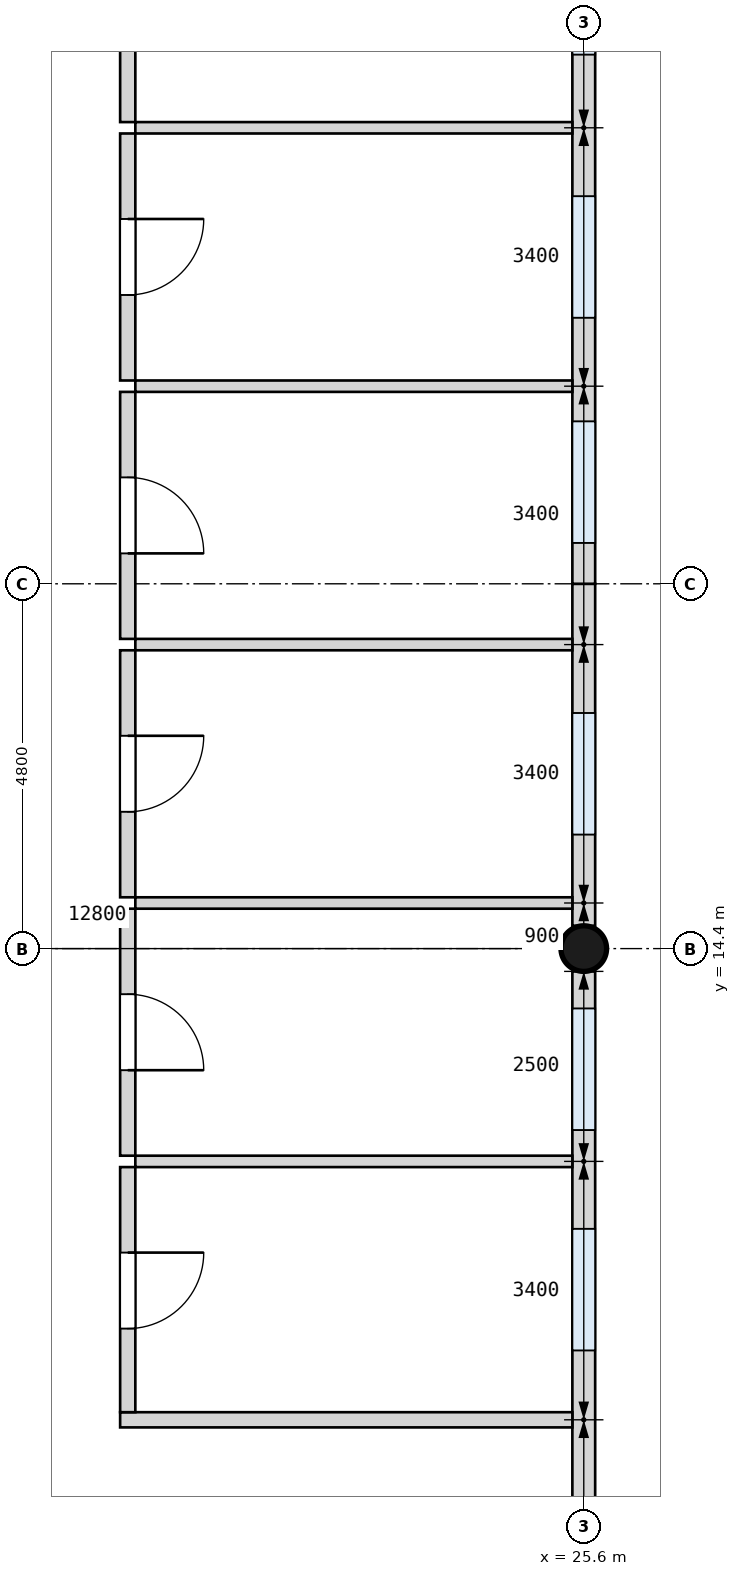
"""IFC4 building model, lengths in metres.
Left out: names, types, materials, properties, quantities, classifications, styles, units other than length and angle.
Written with IfcOpenShell. Run it as: python <this file> out.ifc"""

import sys

from ifc_helpers import new_model, si_unit, direction, frame, frame_2d, origin, origin_2d, place, context, subcontext, project, spatial, rectangle, circle, extrude, element, fill, save


model = new_model("IFC4")
c1 = context("Model", 3, precision=1e-05, world=origin(), true_north=direction((0.0, 1.0)))
c2 = subcontext(c1, "Body", "Model", "MODEL_VIEW")
j1 = project(units=[si_unit("LENGTHUNIT", "METRE"), si_unit("PLANEANGLEUNIT", "RADIAN")], contexts=[c1])
p1 = place(None, origin())
s1 = spatial("IfcSite", under=j1, at=p1, CompositionType="ELEMENT")
p2 = place(p1, origin())
s2 = spatial("IfcBuilding", under=s1, at=p2, CompositionType="ELEMENT")
p3 = place(p2, frame((0.0, 0.0, 4.2)))
s3 = spatial("IfcBuildingStorey", under=s2, at=p3, CompositionType="ELEMENT", Elevation=4.2)
p4 = place(p3, frame((25.6, 14.4, 0.0), z_axis=(0.0, 0.0, 1.0), x_axis=(1.0, 0.0, 0.0)))
e1 = element("IfcColumn", 1, at=p4, inside=s3, PredefinedType="COLUMN", context=c2, shape_type="SweptSolid", body=[
    extrude(circle(Radius=0.3, at=origin_2d()), origin(), (0.0, 0.0, 1.0), 4.2),
])
p5 = place(p3, frame((25.6, 0.3, 0.0), z_axis=(0.0, 0.0, 1.0), x_axis=(0.0, 1.0, 0.0)))
e2 = element("IfcWall", 2, at=p5, inside=s3, PredefinedType="SOLIDWALL", context=c2, shape_type="SweptSolid", body=[
    extrude(rectangle(XDim=13.8, YDim=0.3, at=frame_2d((6.9, 0.0))), origin(), (0.0, 0.0, 1.0), 2.9),
])
p6 = place(p5, frame((1.975, 0.0, 1.0)))
e3 = element("IfcOpeningElement", 3, at=p6, cuts=e2, PredefinedType="OPENING", context=c2, shape_type="SweptSolid", body=[
    extrude(rectangle(XDim=1.6, YDim=1.8, at=frame_2d((0.8, 0.9))), frame((0.0, 0.16, 0.0), z_axis=(0.0, -1.0, 0.0), x_axis=(1.0, 0.0, 0.0)), (0.0, 0.0, 1.0), 0.32),
])
p7 = place(p5, frame((8.812, 0.0, 1.0)))
e4 = element("IfcOpeningElement", 4, at=p7, cuts=e2, PredefinedType="OPENING", context=c2, shape_type="SweptSolid", body=[
    extrude(rectangle(XDim=1.6, YDim=1.8, at=frame_2d((0.8, 0.9))), frame((0.0, 0.16, 0.0), z_axis=(0.0, -1.0, 0.0), x_axis=(1.0, 0.0, 0.0)), (0.0, 0.0, 1.0), 0.32),
])
p8 = place(p5, frame((11.712, 0.0, 1.0)))
e5 = element("IfcOpeningElement", 5, at=p8, cuts=e2, PredefinedType="OPENING", context=c2, shape_type="SweptSolid", body=[
    extrude(rectangle(XDim=1.6, YDim=1.8, at=frame_2d((0.8, 0.9))), frame((0.0, 0.16, 0.0), z_axis=(0.0, -1.0, 0.0), x_axis=(1.0, 0.0, 0.0)), (0.0, 0.0, 1.0), 0.32),
])
p9 = place(p3, frame((25.6, 14.7, 0.0), z_axis=(0.0, 0.0, 1.0), x_axis=(0.0, 1.0, 0.0)))
e6 = element("IfcWall", 6, at=p9, inside=s3, PredefinedType="SOLIDWALL", context=c2, shape_type="SweptSolid", body=[
    extrude(rectangle(XDim=4.5, YDim=0.3, at=frame_2d((2.25, 0.0))), origin(), (0.0, 0.0, 1.0), 2.9),
])
p10 = place(p9, frame((1.2, 0.0, 1.0)))
e7 = element("IfcOpeningElement", 7, at=p10, cuts=e6, PredefinedType="OPENING", context=c2, shape_type="SweptSolid", body=[
    extrude(rectangle(XDim=1.6, YDim=1.8, at=frame_2d((0.8, 0.9))), frame((0.0, 0.16, 0.0), z_axis=(0.0, -1.0, 0.0), x_axis=(1.0, 0.0, 0.0)), (0.0, 0.0, 1.0), 0.32),
])
p11 = place(p3, frame((25.6, 19.2, 0.0), z_axis=(0.0, 0.0, 1.0), x_axis=(0.0, 1.0, 0.0)))
e8 = element("IfcWall", 8, at=p11, inside=s3, PredefinedType="SOLIDWALL", context=c2, shape_type="SweptSolid", body=[
    extrude(rectangle(XDim=9.6, YDim=0.3, at=frame_2d((4.8, 0.0))), origin(), (0.0, 0.0, 1.0), 2.9),
])
p12 = place(p11, frame((0.538, 0.0, 1.0)))
e9 = element("IfcOpeningElement", 9, at=p12, cuts=e8, PredefinedType="OPENING", context=c2, shape_type="SweptSolid", body=[
    extrude(rectangle(XDim=1.6, YDim=1.8, at=frame_2d((0.8, 0.9))), frame((0.0, 0.16, 0.0), z_axis=(0.0, -1.0, 0.0), x_axis=(1.0, 0.0, 0.0)), (0.0, 0.0, 1.0), 0.32),
])
p13 = place(p11, frame((3.5, 0.0, 1.0)))
e10 = element("IfcOpeningElement", 10, at=p13, cuts=e8, PredefinedType="OPENING", context=c2, shape_type="SweptSolid", body=[
    extrude(rectangle(XDim=1.6, YDim=1.8, at=frame_2d((0.8, 0.9))), frame((0.0, 0.16, 0.0), z_axis=(0.0, -1.0, 0.0), x_axis=(1.0, 0.0, 0.0)), (0.0, 0.0, 1.0), 0.32),
])
p14 = place(p11, frame((6.962, 0.0, 1.0)))
e11 = element("IfcOpeningElement", 11, at=p14, cuts=e8, PredefinedType="OPENING", context=c2, shape_type="SweptSolid", body=[
    extrude(rectangle(XDim=1.6, YDim=1.8, at=frame_2d((0.8, 0.9))), frame((0.0, 0.16, 0.0), z_axis=(0.0, -1.0, 0.0), x_axis=(1.0, 0.0, 0.0)), (0.0, 0.0, 1.0), 0.32),
])
p15 = place(p3, frame((19.5, 8.2, 0.0), z_axis=(0.0, 0.0, 1.0), x_axis=(1.0, 0.0, 0.0)))
e12 = element("IfcWall", 12, at=p15, inside=s3, PredefinedType="PARTITIONING", context=c2, shape_type="SweptSolid", body=[
    extrude(rectangle(XDim=5.95, YDim=0.2, at=frame_2d((2.975, 0.0))), origin(), (0.0, 0.0, 1.0), 3.9),
])
for number, where, z_axis, x_axis in (
    (13, (19.7, 11.6, 0.0), (0.0, 0.0, 1.0), (1.0, 0.0, 0.0)),
    (14, (19.7, 15.0, 0.0), (0.0, 0.0, 1.0), (1.0, 0.0, 0.0)),
    (15, (19.7, 18.4, 0.0), (0.0, 0.0, 1.0), (1.0, 0.0, 0.0)),
    (16, (19.7, 21.8, 0.0), (0.0, 0.0, 1.0), (1.0, 0.0, 0.0)),
    (17, (19.7, 25.2, 0.0), (0.0, 0.0, 1.0), (1.0, 0.0, 0.0)),
):
    element("IfcWall", number, at=place(p3, frame(where, z_axis=z_axis, x_axis=x_axis)), inside=s3, PredefinedType="PARTITIONING", context=c2, shape_type="SweptSolid", body=[
        extrude(rectangle(XDim=5.75, YDim=0.15, at=frame_2d((2.875, 0.0))), origin(), (0.0, 0.0, 1.0), 3.9),
    ])
p16 = place(p3, frame((19.6, 8.3, 0.0), z_axis=(0.0, 0.0, 1.0), x_axis=(0.0, 1.0, 0.0)))
e18 = element("IfcWall", 18, at=p16, inside=s3, PredefinedType="PARTITIONING", context=c2, shape_type="SweptSolid", body=[
    extrude(rectangle(XDim=3.225, YDim=0.2, at=frame_2d((1.612, 0.0))), origin(), (0.0, 0.0, 1.0), 3.9),
])
p17 = place(p16, frame((1.1, 0.0, 0.0)))
e19 = element("IfcOpeningElement", 19, at=p17, cuts=e18, PredefinedType="OPENING", context=c2, shape_type="SweptSolid", body=[
    extrude(rectangle(XDim=1.0, YDim=2.1, at=frame_2d((0.5, 1.05))), frame((0.0, 0.11, 0.0), z_axis=(0.0, -1.0, 0.0), x_axis=(1.0, 0.0, 0.0)), (0.0, 0.0, 1.0), 0.22),
])
p18 = place(p3, frame((19.6, 11.675, 0.0), z_axis=(0.0, 0.0, 1.0), x_axis=(0.0, 1.0, 0.0)))
e20 = element("IfcWall", 20, at=p18, inside=s3, PredefinedType="PARTITIONING", context=c2, shape_type="SweptSolid", body=[
    extrude(rectangle(XDim=3.25, YDim=0.2, at=frame_2d((1.625, 0.0))), origin(), (0.0, 0.0, 1.0), 3.9),
])
p19 = place(p18, frame((1.125, 0.0, 0.0)))
e21 = element("IfcOpeningElement", 21, at=p19, cuts=e20, PredefinedType="OPENING", context=c2, shape_type="SweptSolid", body=[
    extrude(rectangle(XDim=1.0, YDim=2.1, at=frame_2d((0.5, 1.05))), frame((0.0, 0.11, 0.0), z_axis=(0.0, -1.0, 0.0), x_axis=(1.0, 0.0, 0.0)), (0.0, 0.0, 1.0), 0.22),
])
p20 = place(p3, frame((19.6, 15.075, 0.0), z_axis=(0.0, 0.0, 1.0), x_axis=(0.0, 1.0, 0.0)))
e22 = element("IfcWall", 22, at=p20, inside=s3, PredefinedType="PARTITIONING", context=c2, shape_type="SweptSolid", body=[
    extrude(rectangle(XDim=3.25, YDim=0.2, at=frame_2d((1.625, 0.0))), origin(), (0.0, 0.0, 1.0), 3.9),
])
p21 = place(p20, frame((1.125, 0.0, 0.0)))
e23 = element("IfcOpeningElement", 23, at=p21, cuts=e22, PredefinedType="OPENING", context=c2, shape_type="SweptSolid", body=[
    extrude(rectangle(XDim=1.0, YDim=2.1, at=frame_2d((0.5, 1.05))), frame((0.0, 0.11, 0.0), z_axis=(0.0, -1.0, 0.0), x_axis=(1.0, 0.0, 0.0)), (0.0, 0.0, 1.0), 0.22),
])
p22 = place(p3, frame((19.6, 18.475, 0.0), z_axis=(0.0, 0.0, 1.0), x_axis=(0.0, 1.0, 0.0)))
e24 = element("IfcWall", 24, at=p22, inside=s3, PredefinedType="PARTITIONING", context=c2, shape_type="SweptSolid", body=[
    extrude(rectangle(XDim=3.25, YDim=0.2, at=frame_2d((1.625, 0.0))), origin(), (0.0, 0.0, 1.0), 3.9),
])
p23 = place(p22, frame((1.125, 0.0, 0.0)))
e25 = element("IfcOpeningElement", 25, at=p23, cuts=e24, PredefinedType="OPENING", context=c2, shape_type="SweptSolid", body=[
    extrude(rectangle(XDim=1.0, YDim=2.1, at=frame_2d((0.5, 1.05))), frame((0.0, 0.11, 0.0), z_axis=(0.0, -1.0, 0.0), x_axis=(1.0, 0.0, 0.0)), (0.0, 0.0, 1.0), 0.22),
])
p24 = place(p3, frame((19.6, 21.875, 0.0), z_axis=(0.0, 0.0, 1.0), x_axis=(0.0, 1.0, 0.0)))
e26 = element("IfcWall", 26, at=p24, inside=s3, PredefinedType="PARTITIONING", context=c2, shape_type="SweptSolid", body=[
    extrude(rectangle(XDim=3.25, YDim=0.2, at=frame_2d((1.625, 0.0))), origin(), (0.0, 0.0, 1.0), 3.9),
])
p25 = place(p24, frame((1.125, 0.0, 0.0)))
e27 = element("IfcOpeningElement", 27, at=p25, cuts=e26, PredefinedType="OPENING", context=c2, shape_type="SweptSolid", body=[
    extrude(rectangle(XDim=1.0, YDim=2.1, at=frame_2d((0.5, 1.05))), frame((0.0, 0.11, 0.0), z_axis=(0.0, -1.0, 0.0), x_axis=(1.0, 0.0, 0.0)), (0.0, 0.0, 1.0), 0.22),
])
p26 = place(p3, frame((19.6, 25.275, 0.0), z_axis=(0.0, 0.0, 1.0), x_axis=(0.0, 1.0, 0.0)))
e28 = element("IfcWall", 28, at=p26, inside=s3, PredefinedType="PARTITIONING", context=c2, shape_type="SweptSolid", body=[
    extrude(rectangle(XDim=3.425, YDim=0.2, at=frame_2d((1.712, 0.0))), origin(), (0.0, 0.0, 1.0), 3.9),
])
p27 = place(p26, frame((1.225, 0.0, 0.0)))
e29 = element("IfcOpeningElement", 29, at=p27, cuts=e28, PredefinedType="OPENING", context=c2, shape_type="SweptSolid", body=[
    extrude(rectangle(XDim=1.0, YDim=2.1, at=frame_2d((0.5, 1.05))), frame((0.0, 0.11, 0.0), z_axis=(0.0, -1.0, 0.0), x_axis=(1.0, 0.0, 0.0)), (0.0, 0.0, 1.0), 0.22),
])
p28 = place(p17, frame((1.0, 0.0, 0.0), z_axis=(0.0, 0.0, 1.0), x_axis=(-1.0, 0.0, 0.0)))
e30 = element("IfcDoor", 30, at=p28, inside=s3, OperationType="SINGLE_SWING_LEFT", PredefinedType="DOOR", context=c2, shape_type="SweptSolid", body=[
    extrude(rectangle(XDim=1.0, YDim=2.1, at=frame_2d((0.5, 1.05))), frame((0.0, 0.025, 0.0), z_axis=(0.0, -1.0, 0.0), x_axis=(1.0, 0.0, 0.0)), (0.0, 0.0, 1.0), 0.05),
])
fill(e19, e30)
p29 = place(p19, frame((1.0, 0.0, 0.0), z_axis=(0.0, 0.0, 1.0), x_axis=(-1.0, 0.0, 0.0)))
e31 = element("IfcDoor", 31, at=p29, inside=s3, OperationType="SINGLE_SWING_RIGHT", PredefinedType="DOOR", context=c2, shape_type="SweptSolid", body=[
    extrude(rectangle(XDim=1.0, YDim=2.1, at=frame_2d((0.5, 1.05))), frame((0.0, 0.025, 0.0), z_axis=(0.0, -1.0, 0.0), x_axis=(1.0, 0.0, 0.0)), (0.0, 0.0, 1.0), 0.05),
])
fill(e21, e31)
p30 = place(p21, frame((1.0, 0.0, 0.0), z_axis=(0.0, 0.0, 1.0), x_axis=(-1.0, 0.0, 0.0)))
e32 = element("IfcDoor", 32, at=p30, inside=s3, OperationType="SINGLE_SWING_LEFT", PredefinedType="DOOR", context=c2, shape_type="SweptSolid", body=[
    extrude(rectangle(XDim=1.0, YDim=2.1, at=frame_2d((0.5, 1.05))), frame((0.0, 0.025, 0.0), z_axis=(0.0, -1.0, 0.0), x_axis=(1.0, 0.0, 0.0)), (0.0, 0.0, 1.0), 0.05),
])
fill(e23, e32)
p31 = place(p23, frame((1.0, 0.0, 0.0), z_axis=(0.0, 0.0, 1.0), x_axis=(-1.0, 0.0, 0.0)))
e33 = element("IfcDoor", 33, at=p31, inside=s3, OperationType="SINGLE_SWING_RIGHT", PredefinedType="DOOR", context=c2, shape_type="SweptSolid", body=[
    extrude(rectangle(XDim=1.0, YDim=2.1, at=frame_2d((0.5, 1.05))), frame((0.0, 0.025, 0.0), z_axis=(0.0, -1.0, 0.0), x_axis=(1.0, 0.0, 0.0)), (0.0, 0.0, 1.0), 0.05),
])
fill(e25, e33)
p32 = place(p25, frame((1.0, 0.0, 0.0), z_axis=(0.0, 0.0, 1.0), x_axis=(-1.0, 0.0, 0.0)))
e34 = element("IfcDoor", 34, at=p32, inside=s3, OperationType="SINGLE_SWING_LEFT", PredefinedType="DOOR", context=c2, shape_type="SweptSolid", body=[
    extrude(rectangle(XDim=1.0, YDim=2.1, at=frame_2d((0.5, 1.05))), frame((0.0, 0.025, 0.0), z_axis=(0.0, -1.0, 0.0), x_axis=(1.0, 0.0, 0.0)), (0.0, 0.0, 1.0), 0.05),
])
fill(e27, e34)
p33 = place(p7, origin())
e35 = element("IfcWindow", 35, at=p33, inside=s3, PartitioningType="SINGLE_PANEL", PredefinedType="WINDOW", context=c2, shape_type="SweptSolid", body=[
    extrude(rectangle(XDim=1.6, YDim=1.8, at=frame_2d((0.8, 0.9))), frame((0.0, 0.03, 0.0), z_axis=(0.0, -1.0, 0.0), x_axis=(1.0, 0.0, 0.0)), (0.0, 0.0, 1.0), 0.06),
])
fill(e4, e35)
p34 = place(p8, origin())
e36 = element("IfcWindow", 36, at=p34, inside=s3, PartitioningType="SINGLE_PANEL", PredefinedType="WINDOW", context=c2, shape_type="SweptSolid", body=[
    extrude(rectangle(XDim=1.6, YDim=1.8, at=frame_2d((0.8, 0.9))), frame((0.0, 0.03, 0.0), z_axis=(0.0, -1.0, 0.0), x_axis=(1.0, 0.0, 0.0)), (0.0, 0.0, 1.0), 0.06),
])
fill(e5, e36)
p35 = place(p10, origin())
e37 = element("IfcWindow", 37, at=p35, inside=s3, PartitioningType="SINGLE_PANEL", PredefinedType="WINDOW", context=c2, shape_type="SweptSolid", body=[
    extrude(rectangle(XDim=1.6, YDim=1.8, at=frame_2d((0.8, 0.9))), frame((0.0, 0.03, 0.0), z_axis=(0.0, -1.0, 0.0), x_axis=(1.0, 0.0, 0.0)), (0.0, 0.0, 1.0), 0.06),
])
fill(e7, e37)
p36 = place(p12, origin())
e38 = element("IfcWindow", 38, at=p36, inside=s3, PartitioningType="SINGLE_PANEL", PredefinedType="WINDOW", context=c2, shape_type="SweptSolid", body=[
    extrude(rectangle(XDim=1.6, YDim=1.8, at=frame_2d((0.8, 0.9))), frame((0.0, 0.03, 0.0), z_axis=(0.0, -1.0, 0.0), x_axis=(1.0, 0.0, 0.0)), (0.0, 0.0, 1.0), 0.06),
])
fill(e9, e38)
p37 = place(p13, origin())
e39 = element("IfcWindow", 39, at=p37, inside=s3, PartitioningType="SINGLE_PANEL", PredefinedType="WINDOW", context=c2, shape_type="SweptSolid", body=[
    extrude(rectangle(XDim=1.6, YDim=1.8, at=frame_2d((0.8, 0.9))), frame((0.0, 0.03, 0.0), z_axis=(0.0, -1.0, 0.0), x_axis=(1.0, 0.0, 0.0)), (0.0, 0.0, 1.0), 0.06),
])
fill(e10, e39)
p38 = place(p14, origin())
e40 = element("IfcWindow", 40, at=p38, inside=s3, PartitioningType="SINGLE_PANEL", PredefinedType="WINDOW", context=c2, shape_type="SweptSolid", body=[
    extrude(rectangle(XDim=1.6, YDim=1.8, at=frame_2d((0.8, 0.9))), frame((0.0, 0.03, 0.0), z_axis=(0.0, -1.0, 0.0), x_axis=(1.0, 0.0, 0.0)), (0.0, 0.0, 1.0), 0.06),
])
fill(e11, e40)
save(model, sys.argv[1])
